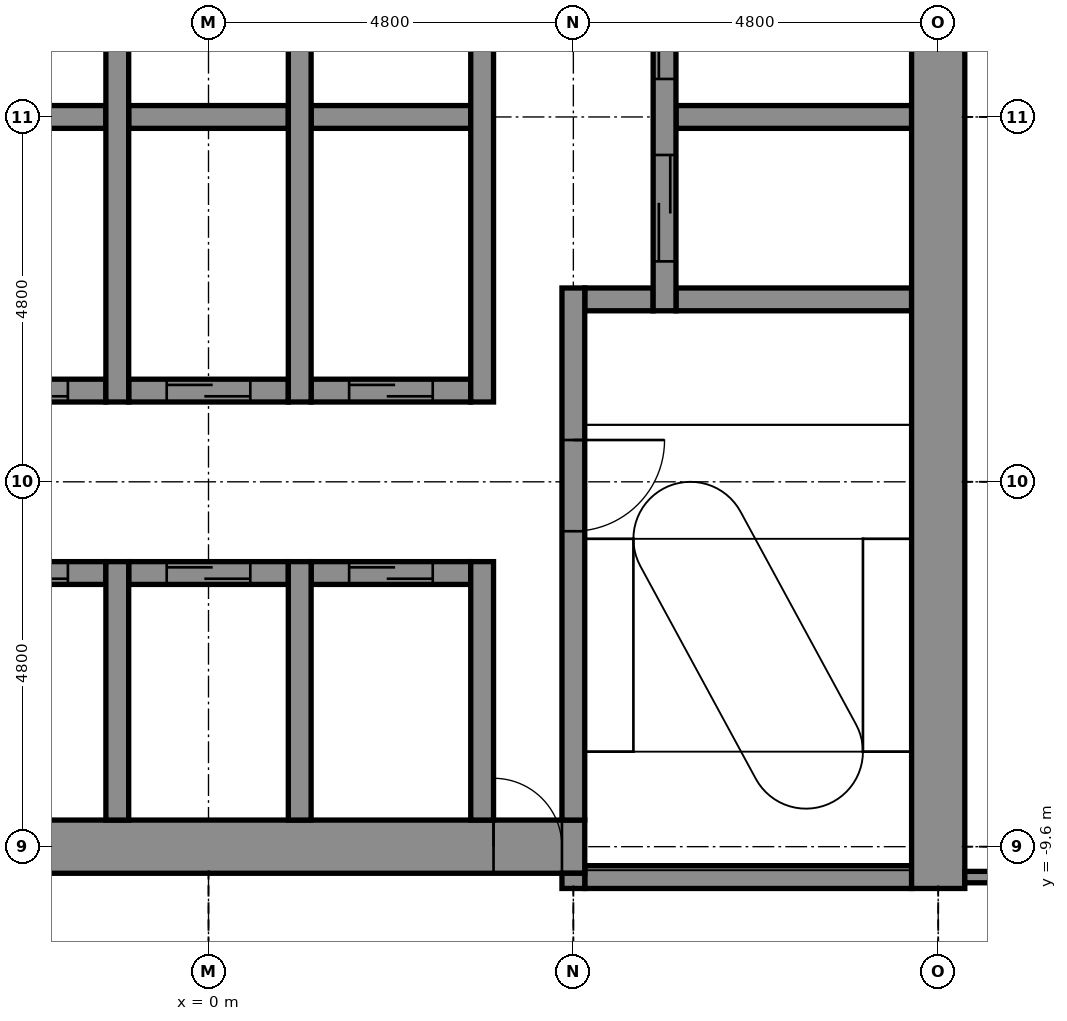
"""IFC4 building model, lengths in metres.
Left out: names, types, materials, properties, quantities, classifications, styles, units other than length and angle.
Written with IfcOpenShell. Run it as: python <this file> out.ifc"""

import sys

from ifc_helpers import new_model, si_unit, direction, frame, frame_2d, origin, place, context, subcontext, project, spatial, rectangle, extrude, element, fill, save


model = new_model("IFC4")
c1 = context("Model", 3, precision=1e-05, world=origin(), true_north=direction((0.0, 1.0)))
c2 = subcontext(c1, "Body", "Model", "MODEL_VIEW")
j1 = project(units=[si_unit("LENGTHUNIT", "METRE"), si_unit("PLANEANGLEUNIT", "RADIAN")], contexts=[c1])
p1 = place(None, origin())
s1 = spatial("IfcSite", under=j1, at=p1, CompositionType="ELEMENT")
p2 = place(p1, origin())
s2 = spatial("IfcBuilding", under=s1, at=p2, CompositionType="ELEMENT")
p3 = place(p2, frame((0.0, 0.0, 154.4)))
s3 = spatial("IfcBuildingStorey", under=s2, at=p3, CompositionType="ELEMENT", Elevation=154.4)
p4 = place(p3, frame((4.95, -10.0, -0.15), z_axis=(0.0, 0.0, 1.0), x_axis=(1.0, 0.0, 0.0)))
e1 = element("IfcWall", 1, at=p4, inside=s3, PredefinedType="STANDARD", context=c2, shape_type="SweptSolid", body=[
    extrude(rectangle(XDim=4.3, YDim=0.3, at=frame_2d((2.15, 0.0))), origin(), (0.0, 0.0, 1.0), 3.9),
])
p5 = place(p3, frame((-5.25, -9.6, -0.15), z_axis=(0.0, 0.0, 1.0), x_axis=(1.0, 0.0, 0.0)))
e2 = element("IfcWall", 2, at=p5, inside=s3, PredefinedType="SHEAR", context=c2, shape_type="SweptSolid", body=[
    extrude(rectangle(XDim=10.2, YDim=0.7, at=frame_2d((5.1, 0.0))), origin(), (0.0, 0.0, 1.0), 3.9),
])
p6 = place(p5, frame((9.0, 0.0, 0.15)))
e3 = element("IfcOpeningElement", 3, at=p6, cuts=e2, PredefinedType="OPENING", context=c2, shape_type="SweptSolid", body=[
    extrude(rectangle(XDim=0.9, YDim=2.1, at=frame_2d((0.45, 1.05))), frame((0.0, 0.36, 0.0), z_axis=(0.0, -1.0, 0.0), x_axis=(1.0, 0.0, 0.0)), (0.0, 0.0, 1.0), 0.72),
])
p7 = place(p3, frame((-3.45, -6.0, -0.15), z_axis=(0.0, 0.0, 1.0), x_axis=(1.0, 0.0, 0.0)))
e4 = element("IfcWall", 4, at=p7, inside=s3, PredefinedType="STANDARD", context=c2, shape_type="SweptSolid", body=[
    extrude(rectangle(XDim=2.1, YDim=0.3, at=frame_2d((1.05, 0.0))), origin(), (0.0, 0.0, 1.0), 3.9),
])
p8 = place(p7, frame((0.5, 0.0, 0.15)))
e5 = element("IfcOpeningElement", 5, at=p8, cuts=e4, PredefinedType="OPENING", context=c2, shape_type="SweptSolid", body=[
    extrude(rectangle(XDim=1.1, YDim=2.1, at=frame_2d((0.55, 1.05))), frame((0.0, 0.16, 0.0), z_axis=(0.0, -1.0, 0.0), x_axis=(1.0, 0.0, 0.0)), (0.0, 0.0, 1.0), 0.32),
])
p9 = place(p3, frame((-1.05, -6.0, -0.15), z_axis=(0.0, 0.0, 1.0), x_axis=(1.0, 0.0, 0.0)))
e6 = element("IfcWall", 6, at=p9, inside=s3, PredefinedType="STANDARD", context=c2, shape_type="SweptSolid", body=[
    extrude(rectangle(XDim=2.1, YDim=0.3, at=frame_2d((1.05, 0.0))), origin(), (0.0, 0.0, 1.0), 3.9),
])
p10 = place(p9, frame((0.5, 0.0, 0.15)))
e7 = element("IfcOpeningElement", 7, at=p10, cuts=e6, PredefinedType="OPENING", context=c2, shape_type="SweptSolid", body=[
    extrude(rectangle(XDim=1.1, YDim=2.1, at=frame_2d((0.55, 1.05))), frame((0.0, 0.16, 0.0), z_axis=(0.0, -1.0, 0.0), x_axis=(1.0, 0.0, 0.0)), (0.0, 0.0, 1.0), 0.32),
])
p11 = place(p3, frame((1.35, -6.0, -0.15), z_axis=(0.0, 0.0, 1.0), x_axis=(1.0, 0.0, 0.0)))
e8 = element("IfcWall", 8, at=p11, inside=s3, PredefinedType="STANDARD", context=c2, shape_type="SweptSolid", body=[
    extrude(rectangle(XDim=2.1, YDim=0.3, at=frame_2d((1.05, 0.0))), origin(), (0.0, 0.0, 1.0), 3.9),
])
p12 = place(p11, frame((0.5, 0.0, 0.15)))
e9 = element("IfcOpeningElement", 9, at=p12, cuts=e8, PredefinedType="OPENING", context=c2, shape_type="SweptSolid", body=[
    extrude(rectangle(XDim=1.1, YDim=2.1, at=frame_2d((0.55, 1.05))), frame((0.0, 0.16, 0.0), z_axis=(0.0, -1.0, 0.0), x_axis=(1.0, 0.0, 0.0)), (0.0, 0.0, 1.0), 0.32),
])
p13 = place(p3, frame((-3.45, -3.6, -0.15), z_axis=(0.0, 0.0, 1.0), x_axis=(1.0, 0.0, 0.0)))
e10 = element("IfcWall", 10, at=p13, inside=s3, PredefinedType="STANDARD", context=c2, shape_type="SweptSolid", body=[
    extrude(rectangle(XDim=2.1, YDim=0.3, at=frame_2d((1.05, 0.0))), origin(), (0.0, 0.0, 1.0), 3.9),
])
p14 = place(p13, frame((0.5, 0.0, 0.15)))
e11 = element("IfcOpeningElement", 11, at=p14, cuts=e10, PredefinedType="OPENING", context=c2, shape_type="SweptSolid", body=[
    extrude(rectangle(XDim=1.1, YDim=2.1, at=frame_2d((0.55, 1.05))), frame((0.0, 0.16, 0.0), z_axis=(0.0, -1.0, 0.0), x_axis=(1.0, 0.0, 0.0)), (0.0, 0.0, 1.0), 0.32),
])
p15 = place(p3, frame((-1.05, -3.6, -0.15), z_axis=(0.0, 0.0, 1.0), x_axis=(1.0, 0.0, 0.0)))
e12 = element("IfcWall", 12, at=p15, inside=s3, PredefinedType="STANDARD", context=c2, shape_type="SweptSolid", body=[
    extrude(rectangle(XDim=2.1, YDim=0.3, at=frame_2d((1.05, 0.0))), origin(), (0.0, 0.0, 1.0), 3.9),
])
p16 = place(p15, frame((0.5, 0.0, 0.15)))
e13 = element("IfcOpeningElement", 13, at=p16, cuts=e12, PredefinedType="OPENING", context=c2, shape_type="SweptSolid", body=[
    extrude(rectangle(XDim=1.1, YDim=2.1, at=frame_2d((0.55, 1.05))), frame((0.0, 0.16, 0.0), z_axis=(0.0, -1.0, 0.0), x_axis=(1.0, 0.0, 0.0)), (0.0, 0.0, 1.0), 0.32),
])
p17 = place(p3, frame((1.35, -3.6, -0.15), z_axis=(0.0, 0.0, 1.0), x_axis=(1.0, 0.0, 0.0)))
e14 = element("IfcWall", 14, at=p17, inside=s3, PredefinedType="STANDARD", context=c2, shape_type="SweptSolid", body=[
    extrude(rectangle(XDim=2.1, YDim=0.3, at=frame_2d((1.05, 0.0))), origin(), (0.0, 0.0, 1.0), 3.9),
])
p18 = place(p17, frame((0.5, 0.0, 0.15)))
e15 = element("IfcOpeningElement", 15, at=p18, cuts=e14, PredefinedType="OPENING", context=c2, shape_type="SweptSolid", body=[
    extrude(rectangle(XDim=1.1, YDim=2.1, at=frame_2d((0.55, 1.05))), frame((0.0, 0.16, 0.0), z_axis=(0.0, -1.0, 0.0), x_axis=(1.0, 0.0, 0.0)), (0.0, 0.0, 1.0), 0.32),
])
p19 = place(p3, frame((4.95, -2.4, -0.15), z_axis=(0.0, 0.0, 1.0), x_axis=(1.0, 0.0, 0.0)))
e16 = element("IfcWall", 16, at=p19, inside=s3, PredefinedType="STANDARD", context=c2, shape_type="SweptSolid", body=[
    extrude(rectangle(XDim=0.9, YDim=0.3, at=frame_2d((0.45, 0.0))), origin(), (0.0, 0.0, 1.0), 3.9),
])
p20 = place(p3, frame((6.15, -2.4, -0.15), z_axis=(0.0, 0.0, 1.0), x_axis=(1.0, 0.0, 0.0)))
e17 = element("IfcWall", 17, at=p20, inside=s3, PredefinedType="STANDARD", context=c2, shape_type="SweptSolid", body=[
    extrude(rectangle(XDim=3.1, YDim=0.3, at=frame_2d((1.55, 0.0))), origin(), (0.0, 0.0, 1.0), 3.9),
])
p21 = place(p3, frame((-3.45, 0.0, -0.15), z_axis=(0.0, 0.0, 1.0), x_axis=(1.0, 0.0, 0.0)))
e18 = element("IfcWall", 18, at=p21, inside=s3, PredefinedType="STANDARD", context=c2, shape_type="SweptSolid", body=[
    extrude(rectangle(XDim=2.1, YDim=0.3, at=frame_2d((1.05, 0.0))), origin(), (0.0, 0.0, 1.0), 3.9),
])
p22 = place(p3, frame((-1.05, 0.0, -0.15), z_axis=(0.0, 0.0, 1.0), x_axis=(1.0, 0.0, 0.0)))
e19 = element("IfcWall", 19, at=p22, inside=s3, PredefinedType="STANDARD", context=c2, shape_type="SweptSolid", body=[
    extrude(rectangle(XDim=2.1, YDim=0.3, at=frame_2d((1.05, 0.0))), origin(), (0.0, 0.0, 1.0), 3.9),
])
p23 = place(p3, frame((1.35, 0.0, -0.15), z_axis=(0.0, 0.0, 1.0), x_axis=(1.0, 0.0, 0.0)))
e20 = element("IfcWall", 20, at=p23, inside=s3, PredefinedType="STANDARD", context=c2, shape_type="SweptSolid", body=[
    extrude(rectangle(XDim=2.1, YDim=0.3, at=frame_2d((1.05, 0.0))), origin(), (0.0, 0.0, 1.0), 3.9),
])
p24 = place(p3, frame((6.15, 0.0, -0.15), z_axis=(0.0, 0.0, 1.0), x_axis=(1.0, 0.0, 0.0)))
e21 = element("IfcWall", 21, at=p24, inside=s3, PredefinedType="STANDARD", context=c2, shape_type="SweptSolid", body=[
    extrude(rectangle(XDim=3.1, YDim=0.3, at=frame_2d((1.55, 0.0))), origin(), (0.0, 0.0, 1.0), 3.9),
])
p25 = place(p3, frame((-1.2, -9.25, -0.15), z_axis=(0.0, 0.0, 1.0), x_axis=(0.0, 1.0, 0.0)))
e22 = element("IfcWall", 22, at=p25, inside=s3, PredefinedType="STANDARD", context=c2, shape_type="SweptSolid", body=[
    extrude(rectangle(XDim=3.4, YDim=0.3, at=frame_2d((1.7, 0.0))), origin(), (0.0, 0.0, 1.0), 3.9),
])
p26 = place(p3, frame((-1.2, -3.75, -0.15), z_axis=(0.0, 0.0, 1.0), x_axis=(0.0, 1.0, 0.0)))
e23 = element("IfcWall", 23, at=p26, inside=s3, PredefinedType="STANDARD", context=c2, shape_type="SweptSolid", body=[
    extrude(rectangle(XDim=7.5, YDim=0.3, at=frame_2d((3.75, 0.0))), origin(), (0.0, 0.0, 1.0), 3.9),
])
p27 = place(p3, frame((1.2, -9.25, -0.15), z_axis=(0.0, 0.0, 1.0), x_axis=(0.0, 1.0, 0.0)))
e24 = element("IfcWall", 24, at=p27, inside=s3, PredefinedType="STANDARD", context=c2, shape_type="SweptSolid", body=[
    extrude(rectangle(XDim=3.4, YDim=0.3, at=frame_2d((1.7, 0.0))), origin(), (0.0, 0.0, 1.0), 3.9),
])
p28 = place(p3, frame((1.2, -3.75, -0.15), z_axis=(0.0, 0.0, 1.0), x_axis=(0.0, 1.0, 0.0)))
e25 = element("IfcWall", 25, at=p28, inside=s3, PredefinedType="STANDARD", context=c2, shape_type="SweptSolid", body=[
    extrude(rectangle(XDim=7.5, YDim=0.3, at=frame_2d((3.75, 0.0))), origin(), (0.0, 0.0, 1.0), 3.9),
])
p29 = place(p3, frame((3.6, -9.25, -0.15), z_axis=(0.0, 0.0, 1.0), x_axis=(0.0, 1.0, 0.0)))
e26 = element("IfcWall", 26, at=p29, inside=s3, PredefinedType="STANDARD", context=c2, shape_type="SweptSolid", body=[
    extrude(rectangle(XDim=3.4, YDim=0.3, at=frame_2d((1.7, 0.0))), origin(), (0.0, 0.0, 1.0), 3.9),
])
p30 = place(p3, frame((3.6, -3.75, -0.15), z_axis=(0.0, 0.0, 1.0), x_axis=(0.0, 1.0, 0.0)))
e27 = element("IfcWall", 27, at=p30, inside=s3, PredefinedType="STANDARD", context=c2, shape_type="SweptSolid", body=[
    extrude(rectangle(XDim=7.5, YDim=0.3, at=frame_2d((3.75, 0.0))), origin(), (0.0, 0.0, 1.0), 3.9),
])
p31 = place(p3, frame((4.8, -10.15, -0.15), z_axis=(0.0, 0.0, 1.0), x_axis=(0.0, 1.0, 0.0)))
e28 = element("IfcWall", 28, at=p31, inside=s3, PredefinedType="STANDARD", context=c2, shape_type="SweptSolid", body=[
    extrude(rectangle(XDim=0.2, YDim=0.3, at=frame_2d((0.1, 0.0))), origin(), (0.0, 0.0, 1.0), 3.9),
])
p32 = place(p3, frame((4.8, -9.25, -0.15), z_axis=(0.0, 0.0, 1.0), x_axis=(0.0, 1.0, 0.0)))
e29 = element("IfcWall", 29, at=p32, inside=s3, PredefinedType="STANDARD", context=c2, shape_type="SweptSolid", body=[
    extrude(rectangle(XDim=7.0, YDim=0.3, at=frame_2d((3.5, 0.0))), origin(), (0.0, 0.0, 1.0), 3.9),
])
p33 = place(p32, frame((3.8, 0.0, 0.15)))
e30 = element("IfcOpeningElement", 30, at=p33, cuts=e29, PredefinedType="OPENING", context=c2, shape_type="SweptSolid", body=[
    extrude(rectangle(XDim=1.2, YDim=2.1, at=frame_2d((0.6, 1.05))), frame((0.0, 0.16, 0.0), z_axis=(0.0, -1.0, 0.0), x_axis=(1.0, 0.0, 0.0)), (0.0, 0.0, 1.0), 0.32),
])
p34 = place(p3, frame((6.0, -2.55, -0.15), z_axis=(0.0, 0.0, 1.0), x_axis=(0.0, 1.0, 0.0)))
e31 = element("IfcWall", 31, at=p34, inside=s3, PredefinedType="STANDARD", context=c2, shape_type="SweptSolid", body=[
    extrude(rectangle(XDim=7.5, YDim=0.3, at=frame_2d((3.75, 0.0))), origin(), (0.0, 0.0, 1.0), 3.9),
])
p35 = place(p34, frame((0.65, 0.0, 0.15)))
e32 = element("IfcOpeningElement", 32, at=p35, cuts=e31, PredefinedType="OPENING", context=c2, shape_type="SweptSolid", body=[
    extrude(rectangle(XDim=1.4, YDim=2.1, at=frame_2d((0.7, 1.05))), frame((0.0, 0.16, 0.0), z_axis=(0.0, -1.0, 0.0), x_axis=(1.0, 0.0, 0.0)), (0.0, 0.0, 1.0), 0.32),
])
p36 = place(p34, frame((3.05, 0.0, 0.15)))
e33 = element("IfcOpeningElement", 33, at=p36, cuts=e31, PredefinedType="OPENING", context=c2, shape_type="SweptSolid", body=[
    extrude(rectangle(XDim=1.4, YDim=2.1, at=frame_2d((0.7, 1.05))), frame((0.0, 0.16, 0.0), z_axis=(0.0, -1.0, 0.0), x_axis=(1.0, 0.0, 0.0)), (0.0, 0.0, 1.0), 0.32),
])
p37 = place(p34, frame((5.45, 0.0, 0.15)))
e34 = element("IfcOpeningElement", 34, at=p37, cuts=e31, PredefinedType="OPENING", context=c2, shape_type="SweptSolid", body=[
    extrude(rectangle(XDim=1.4, YDim=2.1, at=frame_2d((0.7, 1.05))), frame((0.0, 0.16, 0.0), z_axis=(0.0, -1.0, 0.0), x_axis=(1.0, 0.0, 0.0)), (0.0, 0.0, 1.0), 0.32),
])
p38 = place(p3, frame((9.6, -10.15, -0.15), z_axis=(0.0, 0.0, 1.0), x_axis=(0.0, 1.0, 0.0)))
e35 = element("IfcWall", 35, at=p38, inside=s3, PredefinedType="SHEAR", context=c2, shape_type="SweptSolid", body=[
    extrude(rectangle(XDim=20.1, YDim=0.7, at=frame_2d((10.05, 0.0))), origin(), (0.0, 0.0, 1.0), 3.9),
])
p39 = place(p3, frame((9.95, -10.0, 0.0), z_axis=(0.0, 0.0, 1.0), x_axis=(1.0, 0.0, 0.0)))
e36 = element("IfcWall", 36, at=p39, inside=s3, PredefinedType="PARTITIONING", context=c2, shape_type="SweptSolid", body=[
    extrude(rectangle(XDim=9.405, YDim=0.15, at=frame_2d((4.702, 0.0))), origin(), (0.0, 0.0, 1.0), 3.75),
])
p40 = place(p39, frame((3.198, 0.0, 0.0)))
e37 = element("IfcOpeningElement", 37, at=p40, cuts=e36, PredefinedType="OPENING", context=c2, shape_type="SweptSolid", body=[
    extrude(rectangle(XDim=1.8, YDim=2.1, at=frame_2d((0.9, 1.05))), frame((0.0, 0.085, 0.0), z_axis=(0.0, -1.0, 0.0), x_axis=(1.0, 0.0, 0.0)), (0.0, 0.0, 1.0), 0.17),
])
p41 = place(p35, origin())
e38 = element("IfcDoor", 38, at=p41, inside=s3, OperationType="DOUBLE_DOOR_SLIDING", PredefinedType="DOOR", context=c2, shape_type="SweptSolid", body=[
    extrude(rectangle(XDim=1.4, YDim=2.1, at=frame_2d((0.7, 1.05))), frame((0.0, 0.025, 0.0), z_axis=(0.0, -1.0, 0.0), x_axis=(1.0, 0.0, 0.0)), (0.0, 0.0, 1.0), 0.05),
])
fill(e32, e38)
p42 = place(p36, origin())
e39 = element("IfcDoor", 39, at=p42, inside=s3, OperationType="DOUBLE_DOOR_SLIDING", PredefinedType="DOOR", context=c2, shape_type="SweptSolid", body=[
    extrude(rectangle(XDim=1.4, YDim=2.1, at=frame_2d((0.7, 1.05))), frame((0.0, 0.025, 0.0), z_axis=(0.0, -1.0, 0.0), x_axis=(1.0, 0.0, 0.0)), (0.0, 0.0, 1.0), 0.05),
])
fill(e33, e39)
p43 = place(p14, origin())
e40 = element("IfcDoor", 40, at=p43, inside=s3, OperationType="DOUBLE_DOOR_SLIDING", PredefinedType="DOOR", context=c2, shape_type="SweptSolid", body=[
    extrude(rectangle(XDim=1.1, YDim=2.1, at=frame_2d((0.55, 1.05))), frame((0.0, 0.025, 0.0), z_axis=(0.0, -1.0, 0.0), x_axis=(1.0, 0.0, 0.0)), (0.0, 0.0, 1.0), 0.05),
])
fill(e11, e40)
p44 = place(p16, origin())
e41 = element("IfcDoor", 41, at=p44, inside=s3, OperationType="DOUBLE_DOOR_SLIDING", PredefinedType="DOOR", context=c2, shape_type="SweptSolid", body=[
    extrude(rectangle(XDim=1.1, YDim=2.1, at=frame_2d((0.55, 1.05))), frame((0.0, 0.025, 0.0), z_axis=(0.0, -1.0, 0.0), x_axis=(1.0, 0.0, 0.0)), (0.0, 0.0, 1.0), 0.05),
])
fill(e13, e41)
p45 = place(p18, origin())
e42 = element("IfcDoor", 42, at=p45, inside=s3, OperationType="DOUBLE_DOOR_SLIDING", PredefinedType="DOOR", context=c2, shape_type="SweptSolid", body=[
    extrude(rectangle(XDim=1.1, YDim=2.1, at=frame_2d((0.55, 1.05))), frame((0.0, 0.025, 0.0), z_axis=(0.0, -1.0, 0.0), x_axis=(1.0, 0.0, 0.0)), (0.0, 0.0, 1.0), 0.05),
])
fill(e15, e42)
p46 = place(p8, origin())
e43 = element("IfcDoor", 43, at=p46, inside=s3, OperationType="DOUBLE_DOOR_SLIDING", PredefinedType="DOOR", context=c2, shape_type="SweptSolid", body=[
    extrude(rectangle(XDim=1.1, YDim=2.1, at=frame_2d((0.55, 1.05))), frame((0.0, 0.025, 0.0), z_axis=(0.0, -1.0, 0.0), x_axis=(1.0, 0.0, 0.0)), (0.0, 0.0, 1.0), 0.05),
])
fill(e5, e43)
p47 = place(p10, origin())
e44 = element("IfcDoor", 44, at=p47, inside=s3, OperationType="DOUBLE_DOOR_SLIDING", PredefinedType="DOOR", context=c2, shape_type="SweptSolid", body=[
    extrude(rectangle(XDim=1.1, YDim=2.1, at=frame_2d((0.55, 1.05))), frame((0.0, 0.025, 0.0), z_axis=(0.0, -1.0, 0.0), x_axis=(1.0, 0.0, 0.0)), (0.0, 0.0, 1.0), 0.05),
])
fill(e7, e44)
p48 = place(p12, origin())
e45 = element("IfcDoor", 45, at=p48, inside=s3, OperationType="DOUBLE_DOOR_SLIDING", PredefinedType="DOOR", context=c2, shape_type="SweptSolid", body=[
    extrude(rectangle(XDim=1.1, YDim=2.1, at=frame_2d((0.55, 1.05))), frame((0.0, 0.025, 0.0), z_axis=(0.0, -1.0, 0.0), x_axis=(1.0, 0.0, 0.0)), (0.0, 0.0, 1.0), 0.05),
])
fill(e9, e45)
p49 = place(p33, frame((1.2, 0.0, 0.0), z_axis=(0.0, 0.0, 1.0), x_axis=(-1.0, 0.0, 0.0)))
e46 = element("IfcDoor", 46, at=p49, inside=s3, OperationType="SINGLE_SWING_RIGHT", PredefinedType="DOOR", context=c2, shape_type="SweptSolid", body=[
    extrude(rectangle(XDim=1.2, YDim=2.1, at=frame_2d((0.6, 1.05))), frame((0.0, 0.025, 0.0), z_axis=(0.0, -1.0, 0.0), x_axis=(1.0, 0.0, 0.0)), (0.0, 0.0, 1.0), 0.05),
])
fill(e30, e46)
p50 = place(p6, origin())
e47 = element("IfcDoor", 47, at=p50, inside=s3, OperationType="SINGLE_SWING_LEFT", PredefinedType="DOOR", context=c2, shape_type="SweptSolid", body=[
    extrude(rectangle(XDim=0.9, YDim=2.1, at=frame_2d((0.45, 1.05))), frame((0.0, 0.025, 0.0), z_axis=(0.0, -1.0, 0.0), x_axis=(1.0, 0.0, 0.0)), (0.0, 0.0, 1.0), 0.05),
])
fill(e3, e47)
save(model, sys.argv[1])
